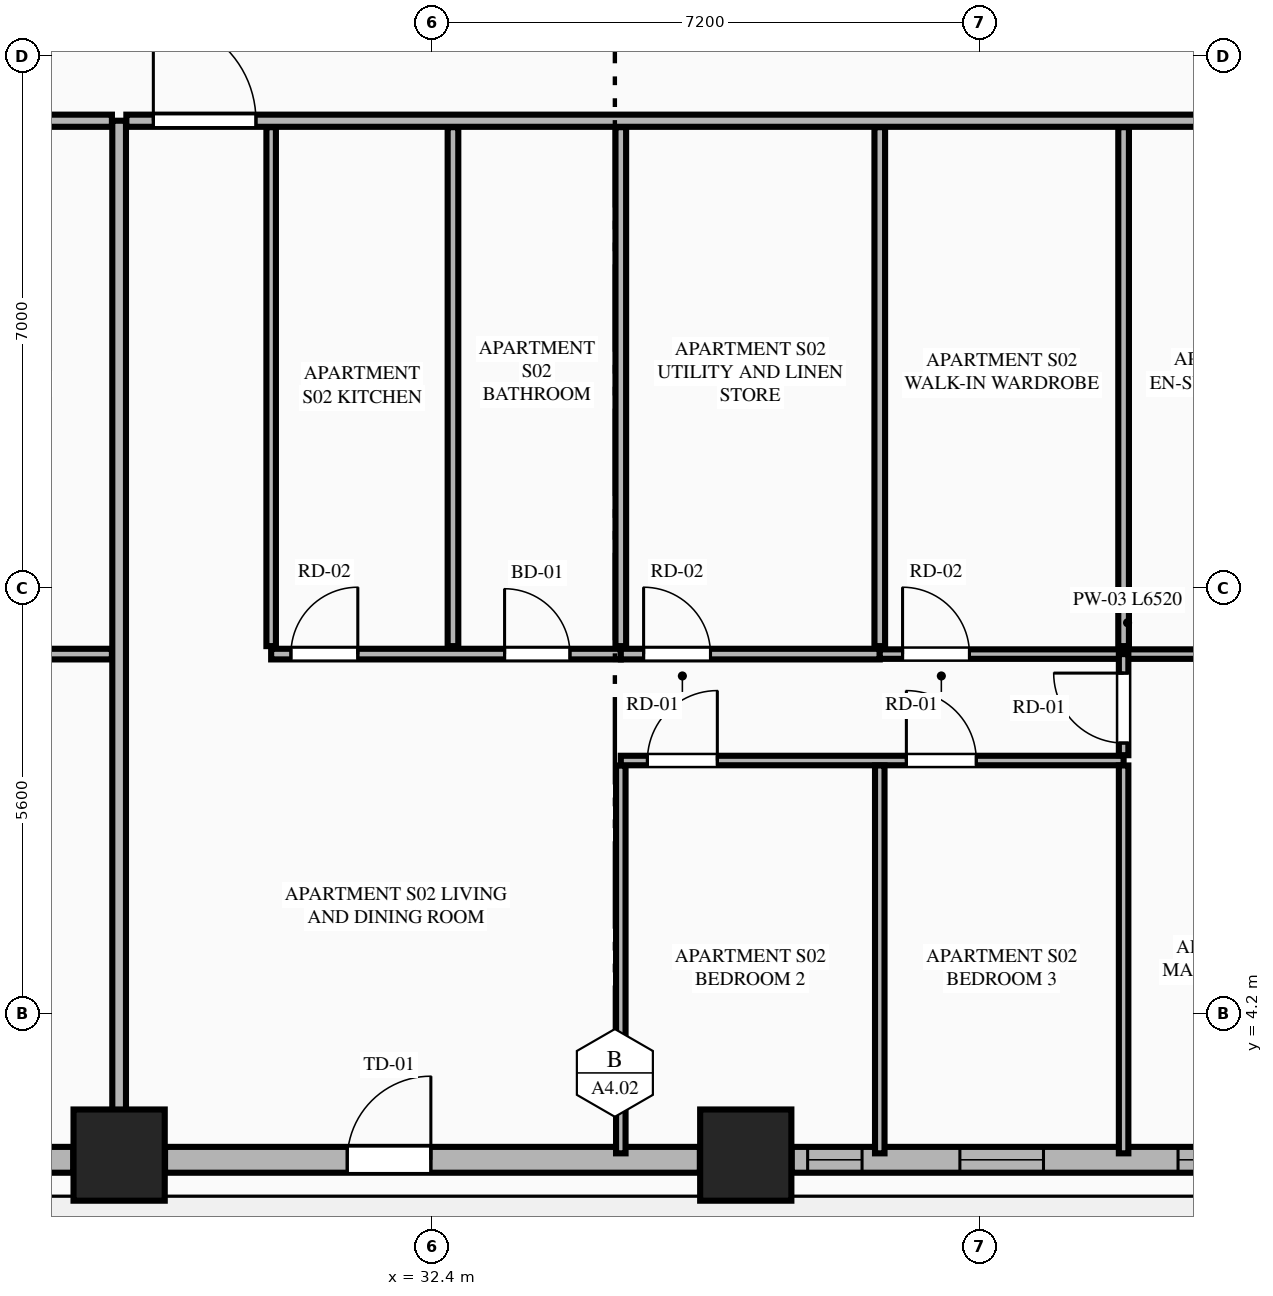
"""IFC4 building model, lengths in metres.
Left out: names, types, materials, properties, quantities, classifications, styles, units other than length and angle.
Written with IfcOpenShell. Run it as: python <this file> out.ifc"""

import sys

from ifc_helpers import new_model, si_unit, direction, frame, frame_2d, origin, origin_2d, place, context, subcontext, project, spatial, rectangle, extrude, element, fill, save


model = new_model("IFC4")
c1 = context("Model", 3, precision=1e-05, world=origin(), true_north=direction((0.0, 1.0)))
c2 = subcontext(c1, "Body", "Model", "MODEL_VIEW")
j1 = project(units=[si_unit("LENGTHUNIT", "METRE"), si_unit("PLANEANGLEUNIT", "RADIAN")], contexts=[c1])
p1 = place(None, origin())
s1 = spatial("IfcSite", under=j1, at=p1, CompositionType="ELEMENT")
p2 = place(p1, origin())
s2 = spatial("IfcBuilding", under=s1, at=p2, CompositionType="ELEMENT")
p3 = place(p2, frame((0.0, 0.0, 28.45)))
s3 = spatial("IfcBuildingStorey", under=s2, at=p3, CompositionType="ELEMENT", Elevation=28.45)
for number, where, z_axis, x_axis in (
    (1, (28.278, 2.342, 0.0), (0.0, 0.0, 1.0), (1.0, 0.0, 0.0)),
    (2, (36.522, 2.342, 0.0), (0.0, 0.0, 1.0), (1.0, 0.0, 0.0)),
):
    element("IfcColumn", number, at=place(p3, frame(where, z_axis=z_axis, x_axis=x_axis)), inside=s3, PredefinedType="COLUMN", context=c2, shape_type="SweptSolid", body=[
        extrude(rectangle(XDim=1.2, YDim=1.2, at=origin_2d()), origin(), (0.0, 0.0, 1.0), 3.55),
    ])
p4 = place(p3, frame((20.887, 2.28, 0.0), z_axis=(0.0, 0.0, 1.0), x_axis=(1.0, 0.0, 0.0)))
e3 = element("IfcWall", 3, at=p4, inside=s3, PredefinedType="STANDARD", context=c2, shape_type="SweptSolid", body=[
    extrude(rectangle(XDim=6.787, YDim=0.34, at=frame_2d((3.394, 0.0))), origin(), (0.0, 0.0, 1.0), 2.787),
])
p5 = place(p4, frame((2.843, 0.0, 0.75)))
e4 = element("IfcOpeningElement", 4, at=p5, cuts=e3, PredefinedType="OPENING", context=c2, shape_type="SweptSolid", body=[
    extrude(rectangle(XDim=1.1, YDim=1.887, at=frame_2d((0.55, 0.943))), frame((0.0, 0.18, 0.0), z_axis=(0.0, -1.0, 0.0), x_axis=(1.0, 0.0, 0.0)), (0.0, 0.0, 1.0), 0.36),
])
p6 = place(p3, frame((28.882, 2.28, 0.0), z_axis=(0.0, 0.0, 1.0), x_axis=(1.0, 0.0, 0.0)))
e5 = element("IfcWall", 5, at=p6, inside=s3, PredefinedType="STANDARD", context=c2, shape_type="SweptSolid", body=[
    extrude(rectangle(XDim=7.036, YDim=0.34, at=frame_2d((3.518, 0.0))), origin(), (0.0, 0.0, 1.0), 2.787),
])
p7 = place(p6, frame((2.397, 0.0, 0.0)))
e6 = element("IfcOpeningElement", 6, at=p7, cuts=e5, PredefinedType="OPENING", context=c2, shape_type="SweptSolid", body=[
    extrude(rectangle(XDim=1.1, YDim=2.25, at=frame_2d((0.55, 1.125))), frame((0.0, 0.18, 0.0), z_axis=(0.0, -1.0, 0.0), x_axis=(1.0, 0.0, 0.0)), (0.0, 0.0, 1.0), 0.36),
])
p8 = place(p3, frame((37.126, 2.28, 0.0), z_axis=(0.0, 0.0, 1.0), x_axis=(1.0, 0.0, 0.0)))
e7 = element("IfcWall", 7, at=p8, inside=s3, PredefinedType="STANDARD", context=c2, shape_type="SweptSolid", body=[
    extrude(rectangle(XDim=6.787, YDim=0.34, at=frame_2d((3.394, 0.0))), origin(), (0.0, 0.0, 1.0), 2.787),
])
p9 = place(p8, frame((2.213, 0.0, 0.75)))
e8 = element("IfcOpeningElement", 8, at=p9, cuts=e7, PredefinedType="OPENING", context=c2, shape_type="SweptSolid", body=[
    extrude(rectangle(XDim=1.1, YDim=1.887, at=frame_2d((0.55, 0.943))), frame((0.0, 0.18, 0.0), z_axis=(0.0, -1.0, 0.0), x_axis=(1.0, 0.0, 0.0)), (0.0, 0.0, 1.0), 0.36),
])
p10 = place(p8, frame((5.083, 0.0, 0.75)))
e9 = element("IfcOpeningElement", 9, at=p10, cuts=e7, PredefinedType="OPENING", context=c2, shape_type="SweptSolid", body=[
    extrude(rectangle(XDim=1.1, YDim=1.887, at=frame_2d((0.55, 0.943))), frame((0.0, 0.18, 0.0), z_axis=(0.0, -1.0, 0.0), x_axis=(1.0, 0.0, 0.0)), (0.0, 0.0, 1.0), 0.36),
])
p11 = place(p8, frame((0.21, 0.0, 0.75)))
e10 = element("IfcOpeningElement", 10, at=p11, cuts=e7, PredefinedType="OPENING", context=c2, shape_type="SweptSolid", body=[
    extrude(rectangle(XDim=0.716, YDim=1.887, at=frame_2d((0.358, 0.943))), frame((0.0, 0.18, 0.0), z_axis=(0.0, -1.0, 0.0), x_axis=(1.0, 0.0, 0.0)), (0.0, 0.0, 1.0), 0.36),
])
p12 = place(p3, frame((28.278, 2.455, 0.0), z_axis=(0.0, 0.0, 1.0), x_axis=(0.0, 1.0, 0.0)))
e11 = element("IfcWall", 11, at=p12, inside=s3, PredefinedType="PARTITIONING", context=c2, shape_type="SweptSolid", body=[
    extrude(rectangle(XDim=13.495, YDim=0.18, at=frame_2d((6.748, 0.0))), origin(), (0.0, 0.0, 1.0), 2.7),
])
p13 = place(p3, frame((19.995, 15.95, 0.0), z_axis=(0.0, 0.0, 1.0), x_axis=(1.0, 0.0, 0.0)))
e12 = element("IfcWall", 12, at=p13, inside=s3, PredefinedType="PARTITIONING", context=c2, shape_type="SweptSolid", body=[
    extrude(rectangle(XDim=8.188, YDim=0.16, at=frame_2d((4.094, 0.0))), origin(), (0.0, 0.0, 1.0), 3.33),
])
p14 = place(p13, frame((0.705, 0.0, 0.0)))
e13 = element("IfcOpeningElement", 13, at=p14, cuts=e12, PredefinedType="OPENING", context=c2, shape_type="SweptSolid", body=[
    extrude(rectangle(XDim=1.02, YDim=2.25, at=frame_2d((0.51, 1.125))), frame((0.0, 0.09, 0.0), z_axis=(0.0, -1.0, 0.0), x_axis=(1.0, 0.0, 0.0)), (0.0, 0.0, 1.0), 0.18),
])
p15 = place(p3, frame((22.25, 8.933, 0.0), z_axis=(0.0, 0.0, 1.0), x_axis=(1.0, 0.0, 0.0)))
e14 = element("IfcWall", 14, at=p15, inside=s3, PredefinedType="PLUMBINGWALL", context=c2, shape_type="SweptSolid", body=[
    extrude(rectangle(XDim=5.933, YDim=0.14, at=frame_2d((2.967, 0.0))), origin(), (0.0, 0.0, 1.0), 3.33),
])
p16 = place(p15, frame((3.988, 0.0, 0.0)))
e15 = element("IfcOpeningElement", 15, at=p16, cuts=e14, PredefinedType="OPENING", context=c2, shape_type="SweptSolid", body=[
    extrude(rectangle(XDim=0.86, YDim=2.1, at=frame_2d((0.43, 1.05))), frame((0.0, 0.08, 0.0), z_axis=(0.0, -1.0, 0.0), x_axis=(1.0, 0.0, 0.0)), (0.0, 0.0, 1.0), 0.16),
])
p17 = place(p15, frame((0.22, 0.0, 0.0)))
e16 = element("IfcOpeningElement", 16, at=p17, cuts=e14, PredefinedType="OPENING", context=c2, shape_type="SweptSolid", body=[
    extrude(rectangle(XDim=0.88, YDim=2.15, at=frame_2d((0.44, 1.075))), frame((0.0, 0.08, 0.0), z_axis=(0.0, -1.0, 0.0), x_axis=(1.0, 0.0, 0.0)), (0.0, 0.0, 1.0), 0.16),
])
p18 = place(p3, frame((28.373, 15.95, 0.0), z_axis=(0.0, 0.0, 1.0), x_axis=(1.0, 0.0, 0.0)))
e17 = element("IfcWall", 17, at=p18, inside=s3, PredefinedType="PARTITIONING", context=c2, shape_type="SweptSolid", body=[
    extrude(rectangle(XDim=16.432, YDim=0.16, at=frame_2d((8.216, 0.0))), origin(), (0.0, 0.0, 1.0), 3.33),
])
p19 = place(p18, frame((0.355, 0.0, 0.0)))
e18 = element("IfcOpeningElement", 18, at=p19, cuts=e17, PredefinedType="OPENING", context=c2, shape_type="SweptSolid", body=[
    extrude(rectangle(XDim=1.35, YDim=2.35, at=frame_2d((0.675, 1.175))), frame((0.0, 0.09, 0.0), z_axis=(0.0, -1.0, 0.0), x_axis=(1.0, 0.0, 0.0)), (0.0, 0.0, 1.0), 0.18),
])
p20 = place(p3, frame((30.278, 9.038, 0.0), z_axis=(0.0, 0.0, 1.0), x_axis=(0.0, 1.0, 0.0)))
e19 = element("IfcWall", 19, at=p20, inside=s3, PredefinedType="PARTITIONING", context=c2, shape_type="SweptSolid", body=[
    extrude(rectangle(XDim=6.827, YDim=0.125, at=frame_2d((3.414, 0.0))), origin(), (0.0, 0.0, 1.0), 3.33),
])
p21 = place(p3, frame((30.278, 8.933, 0.0), z_axis=(0.0, 0.0, 1.0), x_axis=(1.0, 0.0, 0.0)))
e20 = element("IfcWall", 20, at=p21, inside=s3, PredefinedType="PLUMBINGWALL", context=c2, shape_type="SweptSolid", body=[
    extrude(rectangle(XDim=4.6, YDim=0.14, at=frame_2d((2.3, 0.0))), origin(), (0.0, 0.0, 1.0), 3.33),
])
p22 = place(p21, frame((3.071, 0.0, 0.0)))
e21 = element("IfcOpeningElement", 21, at=p22, cuts=e20, PredefinedType="OPENING", context=c2, shape_type="SweptSolid", body=[
    extrude(rectangle(XDim=0.86, YDim=2.1, at=frame_2d((0.43, 1.05))), frame((0.0, 0.08, 0.0), z_axis=(0.0, -1.0, 0.0), x_axis=(1.0, 0.0, 0.0)), (0.0, 0.0, 1.0), 0.16),
])
p23 = place(p21, frame((0.26, 0.0, 0.0)))
e22 = element("IfcOpeningElement", 22, at=p23, cuts=e20, PredefinedType="OPENING", context=c2, shape_type="SweptSolid", body=[
    extrude(rectangle(XDim=0.88, YDim=2.15, at=frame_2d((0.44, 1.075))), frame((0.0, 0.08, 0.0), z_axis=(0.0, -1.0, 0.0), x_axis=(1.0, 0.0, 0.0)), (0.0, 0.0, 1.0), 0.16),
])
p24 = place(p3, frame((34.878, 8.933, 0.0), z_axis=(0.0, 0.0, 1.0), x_axis=(1.0, 0.0, 0.0)))
e23 = element("IfcWall", 23, at=p24, inside=s3, PredefinedType="PLUMBINGWALL", context=c2, shape_type="SweptSolid", body=[
    extrude(rectangle(XDim=3.407, YDim=0.14, at=frame_2d((1.704, 0.0))), origin(), (0.0, 0.0, 1.0), 3.33),
])
p25 = place(p24, frame((0.3, 0.0, 0.0)))
e24 = element("IfcOpeningElement", 24, at=p25, cuts=e23, PredefinedType="OPENING", context=c2, shape_type="SweptSolid", body=[
    extrude(rectangle(XDim=0.88, YDim=2.15, at=frame_2d((0.44, 1.075))), frame((0.0, 0.08, 0.0), z_axis=(0.0, -1.0, 0.0), x_axis=(1.0, 0.0, 0.0)), (0.0, 0.0, 1.0), 0.16),
])
p26 = place(p3, frame((38.285, 8.933, 0.0), z_axis=(0.0, 0.0, 1.0), x_axis=(1.0, 0.0, 0.0)))
e25 = element("IfcWall", 25, at=p26, inside=s3, PredefinedType="PARTITIONING", context=c2, shape_type="SweptSolid", body=[
    extrude(rectangle(XDim=6.52, YDim=0.125, at=frame_2d((3.26, 0.0))), origin(), (0.0, 0.0, 1.0), 3.33),
])
p27 = place(p26, frame((4.439, 0.0, 0.0)))
e26 = element("IfcOpeningElement", 26, at=p27, cuts=e25, PredefinedType="OPENING", context=c2, shape_type="SweptSolid", body=[
    extrude(rectangle(XDim=0.86, YDim=2.1, at=frame_2d((0.43, 1.05))), frame((0.0, 0.073, 0.0), z_axis=(0.0, -1.0, 0.0), x_axis=(1.0, 0.0, 0.0)), (0.0, 0.0, 1.0), 0.145),
])
p28 = place(p26, frame((0.3, 0.0, 0.0)))
e27 = element("IfcOpeningElement", 27, at=p28, cuts=e25, PredefinedType="OPENING", context=c2, shape_type="SweptSolid", body=[
    extrude(rectangle(XDim=0.88, YDim=2.15, at=frame_2d((0.44, 1.075))), frame((0.0, 0.073, 0.0), z_axis=(0.0, -1.0, 0.0), x_axis=(1.0, 0.0, 0.0)), (0.0, 0.0, 1.0), 0.145),
])
p29 = place(p3, frame((32.67, 9.038, 0.0), z_axis=(0.0, 0.0, 1.0), x_axis=(0.0, 1.0, 0.0)))
e28 = element("IfcWall", 28, at=p29, inside=s3, PredefinedType="PLUMBINGWALL", context=c2, shape_type="SweptSolid", body=[
    extrude(rectangle(XDim=6.827, YDim=0.14, at=frame_2d((3.414, 0.0))), origin(), (0.0, 0.0, 1.0), 3.33),
])
p30 = place(p3, frame((34.878, 2.365, 0.0), z_axis=(0.0, 0.0, 1.0), x_axis=(0.0, 1.0, 0.0)))
e29 = element("IfcWall", 29, at=p30, inside=s3, PredefinedType="PARTITIONING", context=c2, shape_type="SweptSolid", body=[
    extrude(rectangle(XDim=5.103, YDim=0.125, at=frame_2d((2.552, 0.0))), origin(), (0.0, 0.0, 1.0), 3.33),
])
p31 = place(p3, frame((34.878, 7.533, 0.0), z_axis=(0.0, 0.0, 1.0), x_axis=(1.0, 0.0, 0.0)))
e30 = element("IfcWall", 30, at=p31, inside=s3, PredefinedType="PARTITIONING", context=c2, shape_type="SweptSolid", body=[
    extrude(rectangle(XDim=6.615, YDim=0.125, at=frame_2d((3.308, 0.0))), origin(), (0.0, 0.0, 1.0), 3.33),
])
p32 = place(p31, frame((0.35, 0.0, 0.0)))
e31 = element("IfcOpeningElement", 31, at=p32, cuts=e30, PredefinedType="OPENING", context=c2, shape_type="SweptSolid", body=[
    extrude(rectangle(XDim=0.92, YDim=2.15, at=frame_2d((0.46, 1.075))), frame((0.0, 0.073, 0.0), z_axis=(0.0, -1.0, 0.0), x_axis=(1.0, 0.0, 0.0)), (0.0, 0.0, 1.0), 0.145),
])
p33 = place(p31, frame((3.757, 0.0, 0.0)))
e32 = element("IfcOpeningElement", 32, at=p33, cuts=e30, PredefinedType="OPENING", context=c2, shape_type="SweptSolid", body=[
    extrude(rectangle(XDim=0.92, YDim=2.15, at=frame_2d((0.46, 1.075))), frame((0.0, 0.073, 0.0), z_axis=(0.0, -1.0, 0.0), x_axis=(1.0, 0.0, 0.0)), (0.0, 0.0, 1.0), 0.145),
])
p34 = place(p3, frame((41.493, 7.603, 0.0), z_axis=(0.0, 0.0, 1.0), x_axis=(0.0, 1.0, 0.0)))
e33 = element("IfcWall", 33, at=p34, inside=s3, PredefinedType="PARTITIONING", context=c2, shape_type="SweptSolid", body=[
    extrude(rectangle(XDim=1.33, YDim=0.125, at=frame_2d((0.665, 0.0))), origin(), (0.0, 0.0, 1.0), 3.33),
])
p35 = place(p34, frame((0.16, 0.0, 0.0)))
e34 = element("IfcOpeningElement", 34, at=p35, cuts=e33, PredefinedType="OPENING", context=c2, shape_type="SweptSolid", body=[
    extrude(rectangle(XDim=0.92, YDim=2.15, at=frame_2d((0.46, 1.075))), frame((0.0, 0.073, 0.0), z_axis=(0.0, -1.0, 0.0), x_axis=(1.0, 0.0, 0.0)), (0.0, 0.0, 1.0), 0.145),
])
for number, where, z_axis, x_axis in (
    (35, (34.878, 9.038, 0.0), (0.0, 0.0, 1.0), (0.0, 1.0, 0.0)),
    (36, (38.285, 9.038, 0.0), (0.0, 0.0, 1.0), (0.0, 1.0, 0.0)),
):
    element("IfcWall", number, at=place(p3, frame(where, z_axis=z_axis, x_axis=x_axis)), inside=s3, PredefinedType="PLUMBINGWALL", context=c2, shape_type="SweptSolid", body=[
        extrude(rectangle(XDim=6.827, YDim=0.14, at=frame_2d((3.414, 0.0))), origin(), (0.0, 0.0, 1.0), 3.33),
    ])
for number, where, z_axis, x_axis in (
    (37, (38.285, 2.365, 0.0), (0.0, 0.0, 1.0), (0.0, 1.0, 0.0)),
    (38, (41.493, 2.365, 0.0), (0.0, 0.0, 1.0), (0.0, 1.0, 0.0)),
):
    element("IfcWall", number, at=place(p3, frame(where, z_axis=z_axis, x_axis=x_axis)), inside=s3, PredefinedType="PARTITIONING", context=c2, shape_type="SweptSolid", body=[
        extrude(rectangle(XDim=5.103, YDim=0.125, at=frame_2d((2.552, 0.0))), origin(), (0.0, 0.0, 1.0), 3.33),
    ])
p36 = place(p3, frame((41.493, 9.038, 0.0), z_axis=(0.0, 0.0, 1.0), x_axis=(0.0, 1.0, 0.0)))
e39 = element("IfcWall", 39, at=p36, inside=s3, PredefinedType="PLUMBINGWALL", context=c2, shape_type="SweptSolid", body=[
    extrude(rectangle(XDim=6.827, YDim=0.14, at=frame_2d((3.414, 0.0))), origin(), (0.0, 0.0, 1.0), 3.33),
])
p37 = place(p7, origin())
e40 = element("IfcDoor", 40, at=p37, inside=s3, OperationType="SINGLE_SWING_RIGHT", PredefinedType="DOOR", context=c2, shape_type="SweptSolid", body=[
    extrude(rectangle(XDim=1.1, YDim=2.25, at=frame_2d((0.55, 1.125))), frame((0.0, 0.025, 0.0), z_axis=(0.0, -1.0, 0.0), x_axis=(1.0, 0.0, 0.0)), (0.0, 0.0, 1.0), 0.05),
])
fill(e6, e40)
p38 = place(p9, origin())
e41 = element("IfcWindow", 41, at=p38, inside=s3, PartitioningType="SINGLE_PANEL", PredefinedType="WINDOW", context=c2, shape_type="SweptSolid", body=[
    extrude(rectangle(XDim=1.1, YDim=1.887, at=frame_2d((0.55, 0.943))), frame((0.0, 0.03, 0.0), z_axis=(0.0, -1.0, 0.0), x_axis=(1.0, 0.0, 0.0)), (0.0, 0.0, 1.0), 0.06),
])
fill(e8, e41)
p39 = place(p22, origin())
e42 = element("IfcDoor", 42, at=p39, inside=s3, OperationType="SINGLE_SWING_LEFT", PredefinedType="DOOR", context=c2, shape_type="SweptSolid", body=[
    extrude(rectangle(XDim=0.86, YDim=2.1, at=frame_2d((0.43, 1.05))), frame((0.0, 0.025, 0.0), z_axis=(0.0, -1.0, 0.0), x_axis=(1.0, 0.0, 0.0)), (0.0, 0.0, 1.0), 0.05),
])
fill(e21, e42)
p40 = place(p19, origin())
e43 = element("IfcDoor", 43, at=p40, inside=s3, OperationType="SINGLE_SWING_LEFT", PredefinedType="DOOR", context=c2, shape_type="SweptSolid", body=[
    extrude(rectangle(XDim=1.35, YDim=2.35, at=frame_2d((0.675, 1.175))), frame((0.0, 0.025, 0.0), z_axis=(0.0, -1.0, 0.0), x_axis=(1.0, 0.0, 0.0)), (0.0, 0.0, 1.0), 0.05),
])
fill(e18, e43)
p41 = place(p23, origin())
e44 = element("IfcDoor", 44, at=p41, inside=s3, OperationType="SINGLE_SWING_RIGHT", PredefinedType="DOOR", context=c2, shape_type="SweptSolid", body=[
    extrude(rectangle(XDim=0.88, YDim=2.15, at=frame_2d((0.44, 1.075))), frame((0.0, 0.025, 0.0), z_axis=(0.0, -1.0, 0.0), x_axis=(1.0, 0.0, 0.0)), (0.0, 0.0, 1.0), 0.05),
])
fill(e22, e44)
p42 = place(p25, origin())
e45 = element("IfcDoor", 45, at=p42, inside=s3, OperationType="SINGLE_SWING_LEFT", PredefinedType="DOOR", context=c2, shape_type="SweptSolid", body=[
    extrude(rectangle(XDim=0.88, YDim=2.15, at=frame_2d((0.44, 1.075))), frame((0.0, 0.025, 0.0), z_axis=(0.0, -1.0, 0.0), x_axis=(1.0, 0.0, 0.0)), (0.0, 0.0, 1.0), 0.05),
])
fill(e24, e45)
p43 = place(p32, origin())
e46 = element("IfcDoor", 46, at=p43, inside=s3, OperationType="SINGLE_SWING_RIGHT", PredefinedType="DOOR", context=c2, shape_type="SweptSolid", body=[
    extrude(rectangle(XDim=0.92, YDim=2.15, at=frame_2d((0.46, 1.075))), frame((0.0, 0.025, 0.0), z_axis=(0.0, -1.0, 0.0), x_axis=(1.0, 0.0, 0.0)), (0.0, 0.0, 1.0), 0.05),
])
fill(e31, e46)
p44 = place(p33, origin())
e47 = element("IfcDoor", 47, at=p44, inside=s3, OperationType="SINGLE_SWING_LEFT", PredefinedType="DOOR", context=c2, shape_type="SweptSolid", body=[
    extrude(rectangle(XDim=0.92, YDim=2.15, at=frame_2d((0.46, 1.075))), frame((0.0, 0.025, 0.0), z_axis=(0.0, -1.0, 0.0), x_axis=(1.0, 0.0, 0.0)), (0.0, 0.0, 1.0), 0.05),
])
fill(e32, e47)
p45 = place(p35, origin())
e48 = element("IfcDoor", 48, at=p45, inside=s3, OperationType="SINGLE_SWING_RIGHT", PredefinedType="DOOR", context=c2, shape_type="SweptSolid", body=[
    extrude(rectangle(XDim=0.92, YDim=2.15, at=frame_2d((0.46, 1.075))), frame((0.0, 0.025, 0.0), z_axis=(0.0, -1.0, 0.0), x_axis=(1.0, 0.0, 0.0)), (0.0, 0.0, 1.0), 0.05),
])
fill(e34, e48)
p46 = place(p28, origin())
e49 = element("IfcDoor", 49, at=p46, inside=s3, OperationType="SINGLE_SWING_LEFT", PredefinedType="DOOR", context=c2, shape_type="SweptSolid", body=[
    extrude(rectangle(XDim=0.88, YDim=2.15, at=frame_2d((0.44, 1.075))), frame((0.0, 0.025, 0.0), z_axis=(0.0, -1.0, 0.0), x_axis=(1.0, 0.0, 0.0)), (0.0, 0.0, 1.0), 0.05),
])
fill(e27, e49)
p47 = place(p10, origin())
e50 = element("IfcWindow", 50, at=p47, inside=s3, PartitioningType="SINGLE_PANEL", PredefinedType="WINDOW", context=c2, shape_type="SweptSolid", body=[
    extrude(rectangle(XDim=1.1, YDim=1.887, at=frame_2d((0.55, 0.943))), frame((0.0, 0.03, 0.0), z_axis=(0.0, -1.0, 0.0), x_axis=(1.0, 0.0, 0.0)), (0.0, 0.0, 1.0), 0.06),
])
fill(e9, e50)
p48 = place(p11, origin())
e51 = element("IfcWindow", 51, at=p48, inside=s3, PartitioningType="SINGLE_PANEL", PredefinedType="WINDOW", context=c2, shape_type="SweptSolid", body=[
    extrude(rectangle(XDim=0.716, YDim=1.887, at=frame_2d((0.358, 0.943))), frame((0.0, 0.03, 0.0), z_axis=(0.0, -1.0, 0.0), x_axis=(1.0, 0.0, 0.0)), (0.0, 0.0, 1.0), 0.06),
])
fill(e10, e51)
save(model, sys.argv[1])
